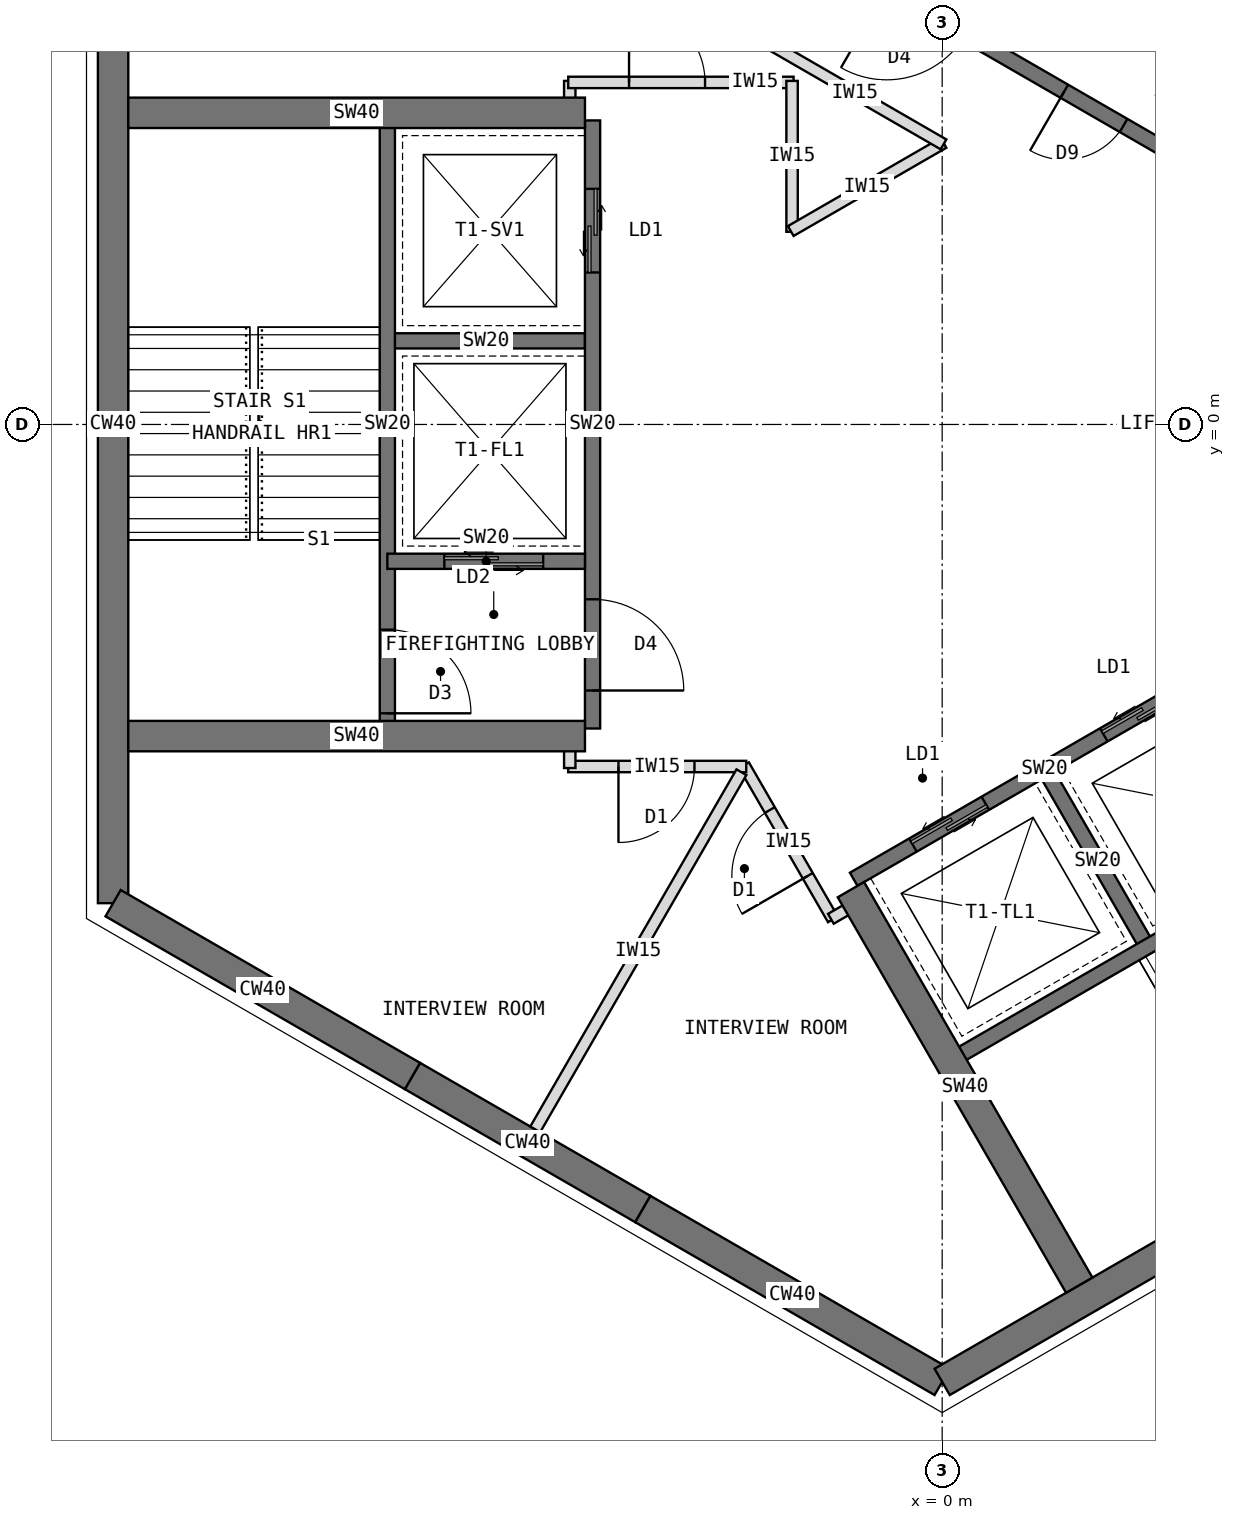
"""IFC4 building model, lengths in metres.
Left out: names, types, materials, properties, quantities, classifications, styles, units other than length and angle.
Written with IfcOpenShell. Run it as: python <this file> out.ifc"""

import sys

from ifc_helpers import new_model, si_unit, direction, frame, frame_2d, origin, place, context, subcontext, project, spatial, rectangle, extrude, element, fill, save


model = new_model("IFC4")
c1 = context("Model", 3, precision=1e-05, world=origin(), true_north=direction((0.0, 1.0)))
c2 = subcontext(c1, "Body", "Model", "MODEL_VIEW")
j1 = project(units=[si_unit("LENGTHUNIT", "METRE"), si_unit("PLANEANGLEUNIT", "RADIAN")], contexts=[c1])
p1 = place(None, origin())
s1 = spatial("IfcSite", under=j1, at=p1, CompositionType="ELEMENT")
p2 = place(p1, origin())
s2 = spatial("IfcBuilding", under=s1, at=p2, CompositionType="ELEMENT")
p3 = place(p2, frame((0.0, 0.0, 279.5)))
s3 = spatial("IfcBuildingStorey", under=s2, at=p3, CompositionType="ELEMENT", Elevation=279.5)
p4 = place(p3, frame((-10.908, 6.298, 0.0), z_axis=(0.0, 0.0, 1.0), x_axis=(0.0, -1.0, 0.0)))
e1 = element("IfcWall", 1, at=p4, inside=s3, PredefinedType="SHEAR", context=c2, shape_type="SweptSolid", body=[
    extrude(rectangle(XDim=12.596, YDim=0.4, at=frame_2d((6.298, 0.0))), origin(), (0.0, 0.0, 1.0), 4.0),
])
p5 = place(p3, frame((-10.908, -6.298, 0.0), z_axis=(0.0, 0.0, 1.0), x_axis=(0.866034513004, -0.499984222037, 0.0)))
e2 = element("IfcWall", 2, at=p5, inside=s3, PredefinedType="SHEAR", context=c2, shape_type="SweptSolid", body=[
    extrude(rectangle(XDim=4.548, YDim=0.4, at=frame_2d((2.274, 0.0))), origin(), (0.0, 0.0, 1.0), 4.0),
])
p6 = place(p3, frame((-6.97, -8.572, 0.0), z_axis=(0.0, 0.0, 1.0), x_axis=(0.866019471182, -0.500010275428, 0.0)))
e3 = element("IfcWall", 3, at=p6, inside=s3, PredefinedType="SHEAR", context=c2, shape_type="SweptSolid", body=[
    extrude(rectangle(XDim=3.5, YDim=0.4, at=frame_2d((1.75, 0.0))), origin(), (0.0, 0.0, 1.0), 4.0),
])
p7 = place(p3, frame((-3.939, -10.322, 0.0), z_axis=(0.0, 0.0, 1.0), x_axis=(0.866011268655, -0.500024481964, 0.0)))
e4 = element("IfcWall", 4, at=p7, inside=s3, PredefinedType="SHEAR", context=c2, shape_type="SweptSolid", body=[
    extrude(rectangle(XDim=4.548, YDim=0.4, at=frame_2d((2.274, 0.0))), origin(), (0.0, 0.0, 1.0), 4.0),
])
p8 = place(p3, frame((0.0, -12.596, 0.0), z_axis=(0.0, 0.0, 1.0), x_axis=(0.866021940709, 0.500005998175, 0.0)))
e5 = element("IfcWall", 5, at=p8, inside=s3, PredefinedType="SHEAR", context=c2, shape_type="SweptSolid", body=[
    extrude(rectangle(XDim=12.596, YDim=0.4, at=frame_2d((6.298, 0.0))), origin(), (0.0, 0.0, 1.0), 4.0),
])
p9 = place(p3, frame((5.764, 1.984, 0.0), z_axis=(0.0, 0.0, 1.0), x_axis=(-0.866026010844, 0.49999894854, 0.0)))
e6 = element("IfcWall", 6, at=p9, inside=s3, PredefinedType="SHEAR", context=c2, shape_type="SweptSolid", body=[
    extrude(rectangle(XDim=8.0, YDim=0.2, at=frame_2d((4.0, 0.0))), origin(), (0.0, 0.0, 1.0), 4.0),
])
p10 = place(p9, frame((6.3, 0.0, 0.0)))
e7 = element("IfcOpeningElement", 7, at=p10, cuts=e6, PredefinedType="OPENING", context=c2, shape_type="SweptSolid", body=[
    extrude(rectangle(XDim=1.2, YDim=2.1, at=frame_2d((0.6, 1.05))), frame((0.0, 0.11, 0.0), z_axis=(0.0, -1.0, 0.0), x_axis=(1.0, 0.0, 0.0)), (0.0, 0.0, 1.0), 0.22),
])
p11 = place(p9, frame((1.0, 0.0, 0.0)))
e8 = element("IfcOpeningElement", 8, at=p11, cuts=e6, PredefinedType="OPENING", context=c2, shape_type="SweptSolid", body=[
    extrude(rectangle(XDim=0.9, YDim=2.1, at=frame_2d((0.45, 1.05))), frame((0.0, 0.11, 0.0), z_axis=(0.0, -1.0, 0.0), x_axis=(1.0, 0.0, 0.0)), (0.0, 0.0, 1.0), 0.22),
])
p12 = place(p9, frame((3.9, 0.0, 0.0)))
e9 = element("IfcOpeningElement", 9, at=p12, cuts=e6, PredefinedType="OPENING", context=c2, shape_type="SweptSolid", body=[
    extrude(rectangle(XDim=0.9, YDim=2.1, at=frame_2d((0.45, 1.05))), frame((0.0, 0.11, 0.0), z_axis=(0.0, -1.0, 0.0), x_axis=(1.0, 0.0, 0.0)), (0.0, 0.0, 1.0), 0.22),
])
p13 = place(p3, frame((7.114, 4.322, 0.0), z_axis=(0.0, 0.0, 1.0), x_axis=(-0.866026010844, 0.49999894854, 0.0)))
e10 = element("IfcWall", 10, at=p13, inside=s3, PredefinedType="SHEAR", context=c2, shape_type="SweptSolid", body=[
    extrude(rectangle(XDim=8.0, YDim=0.2, at=frame_2d((4.0, 0.0))), origin(), (0.0, 0.0, 1.0), 4.0),
])
p14 = place(p13, frame((6.8, 0.0, 0.0)))
e11 = element("IfcOpeningElement", 11, at=p14, cuts=e10, PredefinedType="OPENING", context=c2, shape_type="SweptSolid", body=[
    extrude(rectangle(XDim=0.9, YDim=2.1, at=frame_2d((0.45, 1.05))), frame((0.0, 0.11, 0.0), z_axis=(0.0, -1.0, 0.0), x_axis=(1.0, 0.0, 0.0)), (0.0, 0.0, 1.0), 0.22),
])
p15 = place(p3, frame((-4.6, 4.0, 0.0), z_axis=(0.0, 0.0, 1.0), x_axis=(0.0, -1.0, 0.0)))
e12 = element("IfcWall", 12, at=p15, inside=s3, PredefinedType="SHEAR", context=c2, shape_type="SweptSolid", body=[
    extrude(rectangle(XDim=8.0, YDim=0.2, at=frame_2d((4.0, 0.0))), origin(), (0.0, 0.0, 1.0), 4.0),
])
p16 = place(p15, frame((6.3, 0.0, 0.0)))
e13 = element("IfcOpeningElement", 13, at=p16, cuts=e12, PredefinedType="OPENING", context=c2, shape_type="SweptSolid", body=[
    extrude(rectangle(XDim=1.2, YDim=2.1, at=frame_2d((0.6, 1.05))), frame((0.0, 0.11, 0.0), z_axis=(0.0, -1.0, 0.0), x_axis=(1.0, 0.0, 0.0)), (0.0, 0.0, 1.0), 0.22),
])
p17 = place(p15, frame((0.9, 0.0, 0.0)))
e14 = element("IfcOpeningElement", 14, at=p17, cuts=e12, PredefinedType="OPENING", context=c2, shape_type="SweptSolid", body=[
    extrude(rectangle(XDim=1.1, YDim=2.2, at=frame_2d((0.55, 1.1))), frame((0.0, 0.11, 0.0), z_axis=(0.0, -1.0, 0.0), x_axis=(1.0, 0.0, 0.0)), (0.0, 0.0, 1.0), 0.22),
])
p18 = place(p3, frame((-4.7, 1.1, 0.0), z_axis=(0.0, 0.0, 1.0), x_axis=(-1.0, 0.0, 0.0)))
e15 = element("IfcWall", 15, at=p18, inside=s3, PredefinedType="SHEAR", context=c2, shape_type="SweptSolid", body=[
    extrude(rectangle(XDim=2.6, YDim=0.2, at=frame_2d((1.3, 0.0))), origin(), (0.0, 0.0, 1.0), 4.0),
])
p19 = place(p3, frame((-4.7, -1.8, 0.0), z_axis=(0.0, 0.0, 1.0), x_axis=(-1.0, 0.0, 0.0)))
e16 = element("IfcWall", 16, at=p19, inside=s3, PredefinedType="SHEAR", context=c2, shape_type="SweptSolid", body=[
    extrude(rectangle(XDim=2.6, YDim=0.2, at=frame_2d((1.3, 0.0))), origin(), (0.0, 0.0, 1.0), 4.0),
])
p20 = place(p19, frame((0.55, 0.0, 0.0)))
e17 = element("IfcOpeningElement", 17, at=p20, cuts=e16, PredefinedType="OPENING", context=c2, shape_type="SweptSolid", body=[
    extrude(rectangle(XDim=1.3, YDim=2.2, at=frame_2d((0.65, 1.1))), frame((0.0, 0.11, 0.0), z_axis=(0.0, -1.0, 0.0), x_axis=(1.0, 0.0, 0.0)), (0.0, 0.0, 1.0), 0.22),
])
p21 = place(p3, frame((-7.3, 4.0, 0.0), z_axis=(0.0, 0.0, 1.0), x_axis=(0.0, -1.0, 0.0)))
e18 = element("IfcWall", 18, at=p21, inside=s3, PredefinedType="SHEAR", context=c2, shape_type="SweptSolid", body=[
    extrude(rectangle(XDim=8.0, YDim=0.2, at=frame_2d((4.0, 0.0))), origin(), (0.0, 0.0, 1.0), 4.0),
])
p22 = place(p21, frame((6.7, 0.0, 0.0)))
e19 = element("IfcOpeningElement", 19, at=p22, cuts=e18, PredefinedType="OPENING", context=c2, shape_type="SweptSolid", body=[
    extrude(rectangle(XDim=1.1, YDim=2.1, at=frame_2d((0.55, 1.05))), frame((0.0, 0.11, 0.0), z_axis=(0.0, -1.0, 0.0), x_axis=(1.0, 0.0, 0.0)), (0.0, 0.0, 1.0), 0.22),
])
for number, where, z_axis, x_axis in (
    (20, (-4.7, -4.1, 0.0), (0.0, 0.0, 1.0), (-1.0, 0.0, 0.0)),
    (21, (-4.7, 4.1, 0.0), (0.0, 0.0, 1.0), (-1.0, 0.0, 0.0)),
):
    element("IfcWall", number, at=place(p3, frame(where, z_axis=z_axis, x_axis=x_axis)), inside=s3, PredefinedType="SHEAR", context=c2, shape_type="SweptSolid", body=[
        extrude(rectangle(XDim=6.008, YDim=0.4, at=frame_2d((3.004, 0.0))), origin(), (0.0, 0.0, 1.0), 4.0),
    ])
p23 = place(p3, frame((-1.164, -5.984, 0.0), z_axis=(0.0, 0.0, 1.0), x_axis=(0.866026010844, 0.49999894854, 0.0)))
e22 = element("IfcWall", 22, at=p23, inside=s3, PredefinedType="SHEAR", context=c2, shape_type="SweptSolid", body=[
    extrude(rectangle(XDim=8.0, YDim=0.2, at=frame_2d((4.0, 0.0))), origin(), (0.0, 0.0, 1.0), 4.0),
])
p24 = place(p23, frame((6.3, 0.0, 0.0)))
e23 = element("IfcOpeningElement", 23, at=p24, cuts=e22, PredefinedType="OPENING", context=c2, shape_type="SweptSolid", body=[
    extrude(rectangle(XDim=1.2, YDim=2.1, at=frame_2d((0.6, 1.05))), frame((0.0, 0.11, 0.0), z_axis=(0.0, -1.0, 0.0), x_axis=(1.0, 0.0, 0.0)), (0.0, 0.0, 1.0), 0.22),
])
p25 = place(p23, frame((0.9, 0.0, 0.0)))
e24 = element("IfcOpeningElement", 24, at=p25, cuts=e22, PredefinedType="OPENING", context=c2, shape_type="SweptSolid", body=[
    extrude(rectangle(XDim=1.1, YDim=2.2, at=frame_2d((0.55, 1.1))), frame((0.0, 0.11, 0.0), z_axis=(0.0, -1.0, 0.0), x_axis=(1.0, 0.0, 0.0)), (0.0, 0.0, 1.0), 0.22),
])
p26 = place(p23, frame((3.8, 0.0, 0.0)))
e25 = element("IfcOpeningElement", 25, at=p26, cuts=e22, PredefinedType="OPENING", context=c2, shape_type="SweptSolid", body=[
    extrude(rectangle(XDim=1.1, YDim=2.2, at=frame_2d((0.55, 1.1))), frame((0.0, 0.11, 0.0), z_axis=(0.0, -1.0, 0.0), x_axis=(1.0, 0.0, 0.0)), (0.0, 0.0, 1.0), 0.22),
])
p27 = place(p3, frame((1.397, -4.62, 0.0), z_axis=(0.0, 0.0, 1.0), x_axis=(0.499936506574, -0.866062058628, 0.0)))
e26 = element("IfcWall", 26, at=p27, inside=s3, PredefinedType="SHEAR", context=c2, shape_type="SweptSolid", body=[
    extrude(rectangle(XDim=2.6, YDim=0.2, at=frame_2d((1.3, 0.0))), origin(), (0.0, 0.0, 1.0), 4.0),
])
p28 = place(p3, frame((0.186, -8.322, 0.0), z_axis=(0.0, 0.0, 1.0), x_axis=(0.866026010844, 0.49999894854, 0.0)))
e27 = element("IfcWall", 27, at=p28, inside=s3, PredefinedType="SHEAR", context=c2, shape_type="SweptSolid", body=[
    extrude(rectangle(XDim=8.0, YDim=0.2, at=frame_2d((4.0, 0.0))), origin(), (0.0, 0.0, 1.0), 4.0),
])
p29 = place(p28, frame((6.7, 0.0, 0.0)))
e28 = element("IfcOpeningElement", 28, at=p29, cuts=e27, PredefinedType="OPENING", context=c2, shape_type="SweptSolid", body=[
    extrude(rectangle(XDim=1.1, YDim=2.1, at=frame_2d((0.55, 1.05))), frame((0.0, 0.11, 0.0), z_axis=(0.0, -1.0, 0.0), x_axis=(1.0, 0.0, 0.0)), (0.0, 0.0, 1.0), 0.22),
])
p30 = place(p3, frame((-1.201, -6.12, 0.0), z_axis=(0.0, 0.0, 1.0), x_axis=(0.499997979876, -0.866026570101, 0.0)))
e29 = element("IfcWall", 29, at=p30, inside=s3, PredefinedType="SHEAR", context=c2, shape_type="SweptSolid", body=[
    extrude(rectangle(XDim=6.008, YDim=0.4, at=frame_2d((3.004, 0.0))), origin(), (0.0, 0.0, 1.0), 4.0),
])
p31 = place(p3, frame((-1.437, -6.511, 0.0), z_axis=(0.0, 0.0, 1.0), x_axis=(-0.500074377092, 0.865982457891, 0.0)))
e30 = element("IfcWall", 30, at=p31, inside=s3, PredefinedType="PARTITIONING", context=c2, shape_type="SweptSolid", body=[
    extrude(rectangle(XDim=2.342, YDim=0.15, at=frame_2d((1.171, 0.0))), origin(), (0.0, 0.0, 1.0), 3.8),
])
p32 = place(p31, frame((0.661, 0.0, 0.0)))
e31 = element("IfcOpeningElement", 31, at=p32, cuts=e30, PredefinedType="OPENING", context=c2, shape_type="SweptSolid", body=[
    extrude(rectangle(XDim=1.0, YDim=2.1, at=frame_2d((0.5, 1.05))), frame((0.0, 0.085, 0.0), z_axis=(0.0, -1.0, 0.0), x_axis=(1.0, 0.0, 0.0)), (0.0, 0.0, 1.0), 0.17),
])
p33 = place(p3, frame((-2.578, -4.5, 0.0), z_axis=(0.0, 0.0, 1.0), x_axis=(-1.0, 0.0, 0.0)))
e32 = element("IfcWall", 32, at=p33, inside=s3, PredefinedType="PARTITIONING", context=c2, shape_type="SweptSolid", body=[
    extrude(rectangle(XDim=2.342, YDim=0.15, at=frame_2d((1.171, 0.0))), origin(), (0.0, 0.0, 1.0), 3.8),
])
p34 = place(p33, frame((0.681, 0.0, 0.0)))
e33 = element("IfcOpeningElement", 33, at=p34, cuts=e32, PredefinedType="OPENING", context=c2, shape_type="SweptSolid", body=[
    extrude(rectangle(XDim=1.0, YDim=2.1, at=frame_2d((0.5, 1.05))), frame((0.0, 0.085, 0.0), z_axis=(0.0, -1.0, 0.0), x_axis=(1.0, 0.0, 0.0)), (0.0, 0.0, 1.0), 0.17),
])
for number, where, z_axis, x_axis in (
    (34, (-4.9, -4.52, 0.0), (0.0, 0.0, 1.0), (0.0, 1.0, 0.0)),
    (35, (-4.9, 4.09, 0.0), (0.0, 0.0, 1.0), (0.0, 1.0, 0.0)),
):
    element("IfcWall", number, at=place(p3, frame(where, z_axis=z_axis, x_axis=x_axis)), inside=s3, PredefinedType="PARTITIONING", context=c2, shape_type="SweptSolid", body=[
        extrude(rectangle(XDim=0.43, YDim=0.15, at=frame_2d((0.215, 0.0))), origin(), (0.0, 0.0, 1.0), 3.8),
    ])
p35 = place(p3, frame((-4.92, 4.5, 0.0), z_axis=(0.0, 0.0, 1.0), x_axis=(1.0, 0.0, 0.0)))
e36 = element("IfcWall", 36, at=p35, inside=s3, PredefinedType="PARTITIONING", context=c2, shape_type="SweptSolid", body=[
    extrude(rectangle(XDim=2.965, YDim=0.15, at=frame_2d((1.482, 0.0))), origin(), (0.0, 0.0, 1.0), 3.8),
])
p36 = place(p35, frame((0.8, 0.0, 0.0)))
e37 = element("IfcOpeningElement", 37, at=p36, cuts=e36, PredefinedType="OPENING", context=c2, shape_type="SweptSolid", body=[
    extrude(rectangle(XDim=1.0, YDim=2.1, at=frame_2d((0.5, 1.05))), frame((0.0, 0.085, 0.0), z_axis=(0.0, -1.0, 0.0), x_axis=(1.0, 0.0, 0.0)), (0.0, 0.0, 1.0), 0.17),
])
p37 = place(p3, frame((-1.975, 4.52, 0.0), z_axis=(0.0, 0.0, 1.0), x_axis=(0.0, -1.0, 0.0)))
e38 = element("IfcWall", 38, at=p37, inside=s3, PredefinedType="PARTITIONING", context=c2, shape_type="SweptSolid", body=[
    extrude(rectangle(XDim=1.985, YDim=0.15, at=frame_2d((0.993, 0.0))), origin(), (0.0, 0.0, 1.0), 3.8),
])
p38 = place(p3, frame((-1.992, 2.545, 0.0), z_axis=(0.0, 0.0, 1.0), x_axis=(0.866059450854, 0.499941024108, 0.0)))
e39 = element("IfcWall", 39, at=p38, inside=s3, PredefinedType="PARTITIONING", context=c2, shape_type="SweptSolid", body=[
    extrude(rectangle(XDim=2.321, YDim=0.15, at=frame_2d((1.16, 0.0))), origin(), (0.0, 0.0, 1.0), 3.8),
])
p39 = place(p3, frame((0.017, 3.685, 0.0), z_axis=(0.0, 0.0, 1.0), x_axis=(-0.866036099759, 0.499981473571, 0.0)))
e40 = element("IfcWall", 40, at=p39, inside=s3, PredefinedType="PARTITIONING", context=c2, shape_type="SweptSolid", body=[
    extrude(rectangle(XDim=2.692, YDim=0.15, at=frame_2d((1.346, 0.0))), origin(), (0.0, 0.0, 1.0), 3.8),
])
p40 = place(p3, frame((-1.092, -6.289, 0.0), z_axis=(0.0, 0.0, 1.0), x_axis=(-0.866138304741, -0.499804398801, 0.0)))
e41 = element("IfcWall", 41, at=p40, inside=s3, PredefinedType="PARTITIONING", context=c2, shape_type="SweptSolid", body=[
    extrude(rectangle(XDim=0.43, YDim=0.15, at=frame_2d((0.215, 0.0))), origin(), (0.0, 0.0, 1.0), 3.8),
])
p41 = place(p3, frame((-2.641, -4.575, 0.0), z_axis=(0.0, 0.0, 1.0), x_axis=(-0.500010688608, -0.866019232626, 0.0)))
e42 = element("IfcWall", 42, at=p41, inside=s3, PredefinedType="PARTITIONING", context=c2, shape_type="SweptSolid", body=[
    extrude(rectangle(XDim=5.426, YDim=0.15, at=frame_2d((2.713, 0.0))), origin(), (0.0, 0.0, 1.0), 3.8),
])
p42 = place(p16, origin())
e43 = element("IfcDoor", 43, at=p42, inside=s3, OperationType="SINGLE_SWING_RIGHT", PredefinedType="DOOR", context=c2, shape_type="SweptSolid", body=[
    extrude(rectangle(XDim=1.2, YDim=2.1, at=frame_2d((0.6, 1.05))), frame((0.0, 0.025, 0.0), z_axis=(0.0, -1.0, 0.0), x_axis=(1.0, 0.0, 0.0)), (0.0, 0.0, 1.0), 0.05),
])
fill(e13, e43)
p43 = place(p20, origin())
e44 = element("IfcDoor", 44, at=p43, inside=s3, OperationType="DOUBLE_DOOR_SLIDING", PredefinedType="DOOR", context=c2, shape_type="SweptSolid", body=[
    extrude(rectangle(XDim=1.3, YDim=2.2, at=frame_2d((0.65, 1.1))), frame((0.0, 0.025, 0.0), z_axis=(0.0, -1.0, 0.0), x_axis=(1.0, 0.0, 0.0)), (0.0, 0.0, 1.0), 0.05),
])
fill(e17, e44)
p44 = place(p17, origin())
e45 = element("IfcDoor", 45, at=p44, inside=s3, OperationType="DOUBLE_DOOR_SLIDING", PredefinedType="DOOR", context=c2, shape_type="SweptSolid", body=[
    extrude(rectangle(XDim=1.1, YDim=2.2, at=frame_2d((0.55, 1.1))), frame((0.0, 0.025, 0.0), z_axis=(0.0, -1.0, 0.0), x_axis=(1.0, 0.0, 0.0)), (0.0, 0.0, 1.0), 0.05),
])
fill(e14, e45)
p45 = place(p22, origin())
e46 = element("IfcDoor", 46, at=p45, inside=s3, OperationType="SINGLE_SWING_RIGHT", PredefinedType="DOOR", context=c2, shape_type="SweptSolid", body=[
    extrude(rectangle(XDim=1.1, YDim=2.1, at=frame_2d((0.55, 1.05))), frame((0.0, 0.025, 0.0), z_axis=(0.0, -1.0, 0.0), x_axis=(1.0, 0.0, 0.0)), (0.0, 0.0, 1.0), 0.05),
])
fill(e19, e46)
p46 = place(p25, origin())
e47 = element("IfcDoor", 47, at=p46, inside=s3, OperationType="DOUBLE_DOOR_SLIDING", PredefinedType="DOOR", context=c2, shape_type="SweptSolid", body=[
    extrude(rectangle(XDim=1.1, YDim=2.2, at=frame_2d((0.55, 1.1))), frame((0.0, 0.025, 0.0), z_axis=(0.0, -1.0, 0.0), x_axis=(1.0, 0.0, 0.0)), (0.0, 0.0, 1.0), 0.05),
])
fill(e24, e47)
p47 = place(p26, origin())
e48 = element("IfcDoor", 48, at=p47, inside=s3, OperationType="DOUBLE_DOOR_SLIDING", PredefinedType="DOOR", context=c2, shape_type="SweptSolid", body=[
    extrude(rectangle(XDim=1.1, YDim=2.2, at=frame_2d((0.55, 1.1))), frame((0.0, 0.025, 0.0), z_axis=(0.0, -1.0, 0.0), x_axis=(1.0, 0.0, 0.0)), (0.0, 0.0, 1.0), 0.05),
])
fill(e25, e48)
p48 = place(p34, origin())
e49 = element("IfcDoor", 49, at=p48, inside=s3, OperationType="SINGLE_SWING_RIGHT", PredefinedType="DOOR", context=c2, shape_type="SweptSolid", body=[
    extrude(rectangle(XDim=1.0, YDim=2.1, at=frame_2d((0.5, 1.05))), frame((0.0, 0.025, 0.0), z_axis=(0.0, -1.0, 0.0), x_axis=(1.0, 0.0, 0.0)), (0.0, 0.0, 1.0), 0.05),
])
fill(e33, e49)
p49 = place(p32, origin())
e50 = element("IfcDoor", 50, at=p49, inside=s3, OperationType="SINGLE_SWING_LEFT", PredefinedType="DOOR", context=c2, shape_type="SweptSolid", body=[
    extrude(rectangle(XDim=1.0, YDim=2.1, at=frame_2d((0.5, 1.05))), frame((0.0, 0.025, 0.0), z_axis=(0.0, -1.0, 0.0), x_axis=(1.0, 0.0, 0.0)), (0.0, 0.0, 1.0), 0.05),
])
fill(e31, e50)
p50 = place(p36, origin())
e51 = element("IfcDoor", 51, at=p50, inside=s3, OperationType="SINGLE_SWING_LEFT", PredefinedType="DOOR", context=c2, shape_type="SweptSolid", body=[
    extrude(rectangle(XDim=1.0, YDim=2.1, at=frame_2d((0.5, 1.05))), frame((0.0, 0.025, 0.0), z_axis=(0.0, -1.0, 0.0), x_axis=(1.0, 0.0, 0.0)), (0.0, 0.0, 1.0), 0.05),
])
fill(e37, e51)
p51 = place(p12, origin())
e52 = element("IfcDoor", 52, at=p51, inside=s3, OperationType="SINGLE_SWING_RIGHT", PredefinedType="DOOR", context=c2, shape_type="SweptSolid", body=[
    extrude(rectangle(XDim=0.9, YDim=2.1, at=frame_2d((0.45, 1.05))), frame((0.0, 0.025, 0.0), z_axis=(0.0, -1.0, 0.0), x_axis=(1.0, 0.0, 0.0)), (0.0, 0.0, 1.0), 0.05),
])
fill(e9, e52)
save(model, sys.argv[1])
